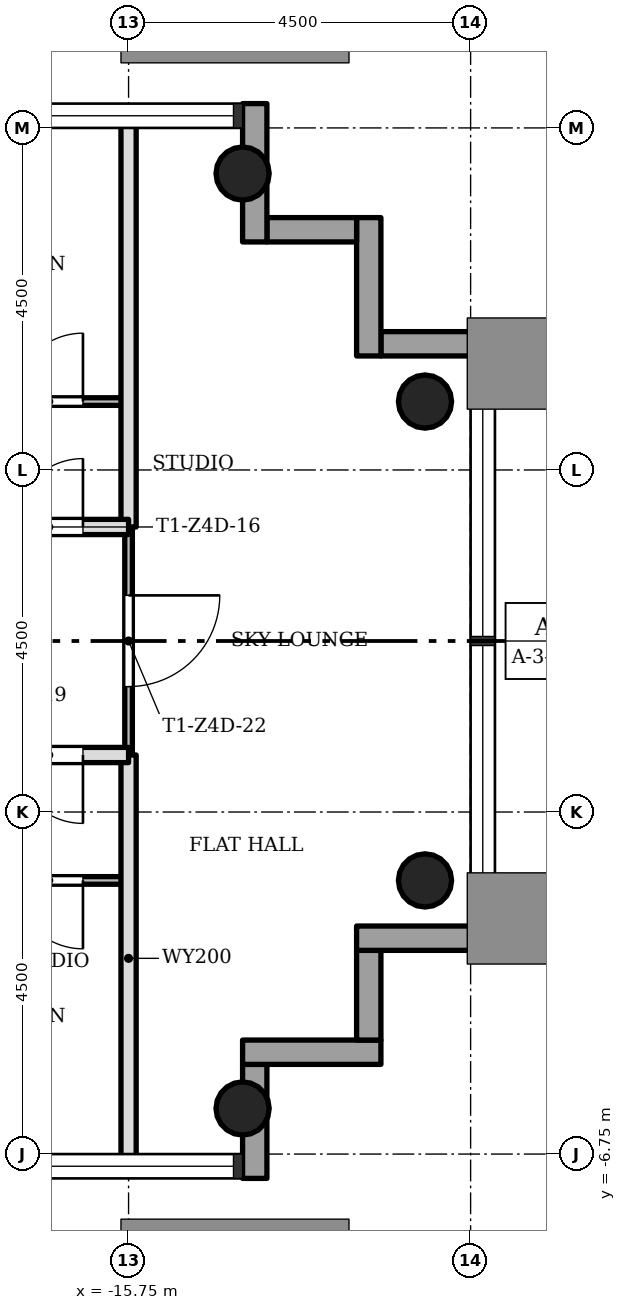
"""IFC4 building model, lengths in metres.
Left out: names, types, materials, properties, quantities, classifications, styles, units other than length and angle.
Written with IfcOpenShell. Run it as: python <this file> out.ifc"""

import sys

from ifc_helpers import new_model, si_unit, direction, frame, frame_2d, origin, origin_2d, place, context, subcontext, project, spatial, rectangle, hollow_circle, extrude, element, fill, save


model = new_model("IFC4")
c1 = context("Model", 3, precision=1e-05, world=origin(), true_north=direction((0.0, 1.0)))
c2 = subcontext(c1, "Body", "Model", "MODEL_VIEW")
j1 = project(units=[si_unit("LENGTHUNIT", "METRE"), si_unit("PLANEANGLEUNIT", "RADIAN")], contexts=[c1])
p1 = place(None, origin())
s1 = spatial("IfcSite", under=j1, at=p1, CompositionType="ELEMENT")
p2 = place(p1, origin())
s2 = spatial("IfcBuilding", under=s1, at=p2, CompositionType="ELEMENT")
p3 = place(p2, frame((0.0, 0.0, 196.0)))
s3 = spatial("IfcBuildingStorey", under=s2, at=p3, CompositionType="ELEMENT", Elevation=196.0)
for number, where, z_axis, x_axis in (
    (1, (-14.25, -6.15, 0.0), (0.0, 0.0, 1.0), (1.0, 0.0, 0.0)),
    (2, (-14.25, 6.15, 0.0), (0.0, 0.0, 1.0), (1.0, 0.0, 0.0)),
    (3, (-11.85, -3.15, 0.0), (0.0, 0.0, 1.0), (1.0, 0.0, 0.0)),
    (4, (-11.85, 3.15, 0.0), (0.0, 0.0, 1.0), (1.0, 0.0, 0.0)),
):
    element("IfcColumn", number, at=place(p3, frame(where, z_axis=z_axis, x_axis=x_axis)), inside=s3, PredefinedType="COLUMN", context=c2, shape_type="SweptSolid", body=[
        extrude(hollow_circle(Radius=0.35, WallThickness=0.025, at=origin_2d()), origin(), (0.0, 0.0, 1.0), 3.4),
    ])
p4 = place(p3, frame((-14.09, -7.07, -0.3), z_axis=(0.0, 0.0, 1.0), x_axis=(0.0, 1.0, 0.0)))
e5 = element("IfcWall", 5, at=p4, inside=s3, PredefinedType="STANDARD", context=c2, shape_type="SweptSolid", body=[
    extrude(rectangle(XDim=1.5, YDim=0.32, at=frame_2d((0.75, 0.0))), origin(), (0.0, 0.0, 1.0), 3.4),
])
p5 = place(p3, frame((-14.25, -5.41, -0.3), z_axis=(0.0, 0.0, 1.0), x_axis=(1.0, 0.0, 0.0)))
e6 = element("IfcWall", 6, at=p5, inside=s3, PredefinedType="STANDARD", context=c2, shape_type="SweptSolid", body=[
    extrude(rectangle(XDim=1.82, YDim=0.32, at=frame_2d((0.91, 0.0))), origin(), (0.0, 0.0, 1.0), 3.4),
])
p6 = place(p3, frame((-12.59, -5.25, -0.3), z_axis=(0.0, 0.0, 1.0), x_axis=(0.0, 1.0, 0.0)))
e7 = element("IfcWall", 7, at=p6, inside=s3, PredefinedType="STANDARD", context=c2, shape_type="SweptSolid", body=[
    extrude(rectangle(XDim=1.18, YDim=0.32, at=frame_2d((0.59, 0.0))), origin(), (0.0, 0.0, 1.0), 3.4),
])
p7 = place(p3, frame((-12.75, -3.91, -0.3), z_axis=(0.0, 0.0, 1.0), x_axis=(1.0, 0.0, 0.0)))
e8 = element("IfcWall", 8, at=p7, inside=s3, PredefinedType="STANDARD", context=c2, shape_type="SweptSolid", body=[
    extrude(rectangle(XDim=1.82, YDim=0.32, at=frame_2d((0.91, 0.0))), origin(), (0.0, 0.0, 1.0), 3.4),
])
p8 = place(p3, frame((-10.93, 3.91, -0.3), z_axis=(0.0, 0.0, 1.0), x_axis=(-1.0, 0.0, 0.0)))
e9 = element("IfcWall", 9, at=p8, inside=s3, PredefinedType="STANDARD", context=c2, shape_type="SweptSolid", body=[
    extrude(rectangle(XDim=1.5, YDim=0.32, at=frame_2d((0.75, 0.0))), origin(), (0.0, 0.0, 1.0), 3.4),
])
p9 = place(p3, frame((-12.59, 3.75, -0.3), z_axis=(0.0, 0.0, 1.0), x_axis=(0.0, 1.0, 0.0)))
e10 = element("IfcWall", 10, at=p9, inside=s3, PredefinedType="STANDARD", context=c2, shape_type="SweptSolid", body=[
    extrude(rectangle(XDim=1.82, YDim=0.32, at=frame_2d((0.91, 0.0))), origin(), (0.0, 0.0, 1.0), 3.4),
])
p10 = place(p3, frame((-12.75, 5.41, -0.3), z_axis=(0.0, 0.0, 1.0), x_axis=(-1.0, 0.0, 0.0)))
e11 = element("IfcWall", 11, at=p10, inside=s3, PredefinedType="STANDARD", context=c2, shape_type="SweptSolid", body=[
    extrude(rectangle(XDim=1.18, YDim=0.32, at=frame_2d((0.59, 0.0))), origin(), (0.0, 0.0, 1.0), 3.4),
])
p11 = place(p3, frame((-14.09, 5.25, -0.3), z_axis=(0.0, 0.0, 1.0), x_axis=(0.0, 1.0, 0.0)))
e12 = element("IfcWall", 12, at=p11, inside=s3, PredefinedType="STANDARD", context=c2, shape_type="SweptSolid", body=[
    extrude(rectangle(XDim=1.82, YDim=0.32, at=frame_2d((0.91, 0.0))), origin(), (0.0, 0.0, 1.0), 3.4),
])
p12 = place(p3, frame((-15.75, -1.5, 0.0), z_axis=(0.0, 0.0, 1.0), x_axis=(0.0, 1.0, 0.0)))
e13 = element("IfcWall", 13, at=p12, inside=s3, PredefinedType="PARTITIONING", context=c2, shape_type="SweptSolid", body=[
    extrude(rectangle(XDim=3.0, YDim=0.1, at=frame_2d((1.5, 0.0))), origin(), (0.0, 0.0, 1.0), 3.0),
])
p13 = place(p12, frame((0.9, 0.0, 0.0)))
e14 = element("IfcOpeningElement", 14, at=p13, cuts=e13, PredefinedType="OPENING", context=c2, shape_type="SweptSolid", body=[
    extrude(rectangle(XDim=1.2, YDim=2.1, at=frame_2d((0.6, 1.05))), frame((0.0, 0.06, 0.0), z_axis=(0.0, -1.0, 0.0), x_axis=(1.0, 0.0, 0.0)), (0.0, 0.0, 1.0), 0.12),
])
for number, where, z_axis, x_axis in (
    (15, (-15.75, -6.85, 0.0), (0.0, 0.0, 1.0), (0.0, 1.0, 0.0)),
    (16, (-15.75, 1.5, 0.0), (0.0, 0.0, 1.0), (0.0, 1.0, 0.0)),
):
    element("IfcWall", number, at=place(p3, frame(where, z_axis=z_axis, x_axis=x_axis)), inside=s3, PredefinedType="SOLIDWALL", context=c2, shape_type="SweptSolid", body=[
        extrude(rectangle(XDim=5.35, YDim=0.2, at=frame_2d((2.675, 0.0))), origin(), (0.0, 0.0, 1.0), 3.0),
    ])
p14 = place(p3, frame((-20.25, -3.15, 0.0), z_axis=(0.0, 0.0, 1.0), x_axis=(1.0, 0.0, 0.0)))
e17 = element("IfcWall", 17, at=p14, inside=s3, PredefinedType="PARTITIONING", context=c2, shape_type="SweptSolid", body=[
    extrude(rectangle(XDim=4.5, YDim=0.1, at=frame_2d((2.25, 0.0))), origin(), (0.0, 0.0, 1.0), 3.0),
])
p15 = place(p14, frame((3.0, 0.0, 0.0)))
e18 = element("IfcOpeningElement", 18, at=p15, cuts=e17, PredefinedType="OPENING", context=c2, shape_type="SweptSolid", body=[
    extrude(rectangle(XDim=0.9, YDim=2.1, at=frame_2d((0.45, 1.05))), frame((0.0, 0.06, 0.0), z_axis=(0.0, -1.0, 0.0), x_axis=(1.0, 0.0, 0.0)), (0.0, 0.0, 1.0), 0.12),
])
p16 = place(p3, frame((-20.25, -1.5, 0.0), z_axis=(0.0, 0.0, 1.0), x_axis=(1.0, 0.0, 0.0)))
e19 = element("IfcWall", 19, at=p16, inside=s3, PredefinedType="SOLIDWALL", context=c2, shape_type="SweptSolid", body=[
    extrude(rectangle(XDim=4.5, YDim=0.2, at=frame_2d((2.25, 0.0))), origin(), (0.0, 0.0, 1.0), 3.0),
])
p17 = place(p16, frame((3.0, 0.0, 0.0)))
e20 = element("IfcOpeningElement", 20, at=p17, cuts=e19, PredefinedType="OPENING", context=c2, shape_type="SweptSolid", body=[
    extrude(rectangle(XDim=0.9, YDim=2.1, at=frame_2d((0.45, 1.05))), frame((0.0, 0.11, 0.0), z_axis=(0.0, -1.0, 0.0), x_axis=(1.0, 0.0, 0.0)), (0.0, 0.0, 1.0), 0.22),
])
p18 = place(p3, frame((-20.25, 1.5, 0.0), z_axis=(0.0, 0.0, 1.0), x_axis=(1.0, 0.0, 0.0)))
e21 = element("IfcWall", 21, at=p18, inside=s3, PredefinedType="SOLIDWALL", context=c2, shape_type="SweptSolid", body=[
    extrude(rectangle(XDim=4.5, YDim=0.2, at=frame_2d((2.25, 0.0))), origin(), (0.0, 0.0, 1.0), 3.0),
])
p19 = place(p18, frame((3.0, 0.0, 0.0)))
e22 = element("IfcOpeningElement", 22, at=p19, cuts=e21, PredefinedType="OPENING", context=c2, shape_type="SweptSolid", body=[
    extrude(rectangle(XDim=0.9, YDim=2.1, at=frame_2d((0.45, 1.05))), frame((0.0, 0.11, 0.0), z_axis=(0.0, -1.0, 0.0), x_axis=(1.0, 0.0, 0.0)), (0.0, 0.0, 1.0), 0.22),
])
p20 = place(p3, frame((-20.25, 3.15, 0.0), z_axis=(0.0, 0.0, 1.0), x_axis=(1.0, 0.0, 0.0)))
e23 = element("IfcWall", 23, at=p20, inside=s3, PredefinedType="PARTITIONING", context=c2, shape_type="SweptSolid", body=[
    extrude(rectangle(XDim=4.5, YDim=0.1, at=frame_2d((2.25, 0.0))), origin(), (0.0, 0.0, 1.0), 3.0),
])
p21 = place(p20, frame((3.0, 0.0, 0.0)))
e24 = element("IfcOpeningElement", 24, at=p21, cuts=e23, PredefinedType="OPENING", context=c2, shape_type="SweptSolid", body=[
    extrude(rectangle(XDim=0.9, YDim=2.1, at=frame_2d((0.45, 1.05))), frame((0.0, 0.06, 0.0), z_axis=(0.0, -1.0, 0.0), x_axis=(1.0, 0.0, 0.0)), (0.0, 0.0, 1.0), 0.12),
])
p22 = place(p19, origin())
e25 = element("IfcDoor", 25, at=p22, inside=s3, OperationType="SINGLE_SWING_LEFT", PredefinedType="DOOR", context=c2, shape_type="SweptSolid", body=[
    extrude(rectangle(XDim=0.9, YDim=2.1, at=frame_2d((0.45, 1.05))), frame((0.0, 0.025, 0.0), z_axis=(0.0, -1.0, 0.0), x_axis=(1.0, 0.0, 0.0)), (0.0, 0.0, 1.0), 0.05),
])
fill(e22, e25)
p23 = place(p21, origin())
e26 = element("IfcDoor", 26, at=p23, inside=s3, OperationType="SINGLE_SWING_LEFT", PredefinedType="DOOR", context=c2, shape_type="SweptSolid", body=[
    extrude(rectangle(XDim=0.9, YDim=2.1, at=frame_2d((0.45, 1.05))), frame((0.0, 0.025, 0.0), z_axis=(0.0, -1.0, 0.0), x_axis=(1.0, 0.0, 0.0)), (0.0, 0.0, 1.0), 0.05),
])
fill(e24, e26)
p24 = place(p17, origin())
e27 = element("IfcDoor", 27, at=p24, inside=s3, OperationType="SINGLE_SWING_RIGHT", PredefinedType="DOOR", context=c2, shape_type="SweptSolid", body=[
    extrude(rectangle(XDim=0.9, YDim=2.1, at=frame_2d((0.45, 1.05))), frame((0.0, 0.025, 0.0), z_axis=(0.0, -1.0, 0.0), x_axis=(1.0, 0.0, 0.0)), (0.0, 0.0, 1.0), 0.05),
])
fill(e20, e27)
p25 = place(p15, origin())
e28 = element("IfcDoor", 28, at=p25, inside=s3, OperationType="SINGLE_SWING_RIGHT", PredefinedType="DOOR", context=c2, shape_type="SweptSolid", body=[
    extrude(rectangle(XDim=0.9, YDim=2.1, at=frame_2d((0.45, 1.05))), frame((0.0, 0.025, 0.0), z_axis=(0.0, -1.0, 0.0), x_axis=(1.0, 0.0, 0.0)), (0.0, 0.0, 1.0), 0.05),
])
fill(e18, e28)
p26 = place(p13, origin())
e29 = element("IfcDoor", 29, at=p26, inside=s3, OperationType="SINGLE_SWING_RIGHT", PredefinedType="DOOR", context=c2, shape_type="SweptSolid", body=[
    extrude(rectangle(XDim=1.2, YDim=2.1, at=frame_2d((0.6, 1.05))), frame((0.0, 0.025, 0.0), z_axis=(0.0, -1.0, 0.0), x_axis=(1.0, 0.0, 0.0)), (0.0, 0.0, 1.0), 0.05),
])
fill(e14, e29)
save(model, sys.argv[1])
